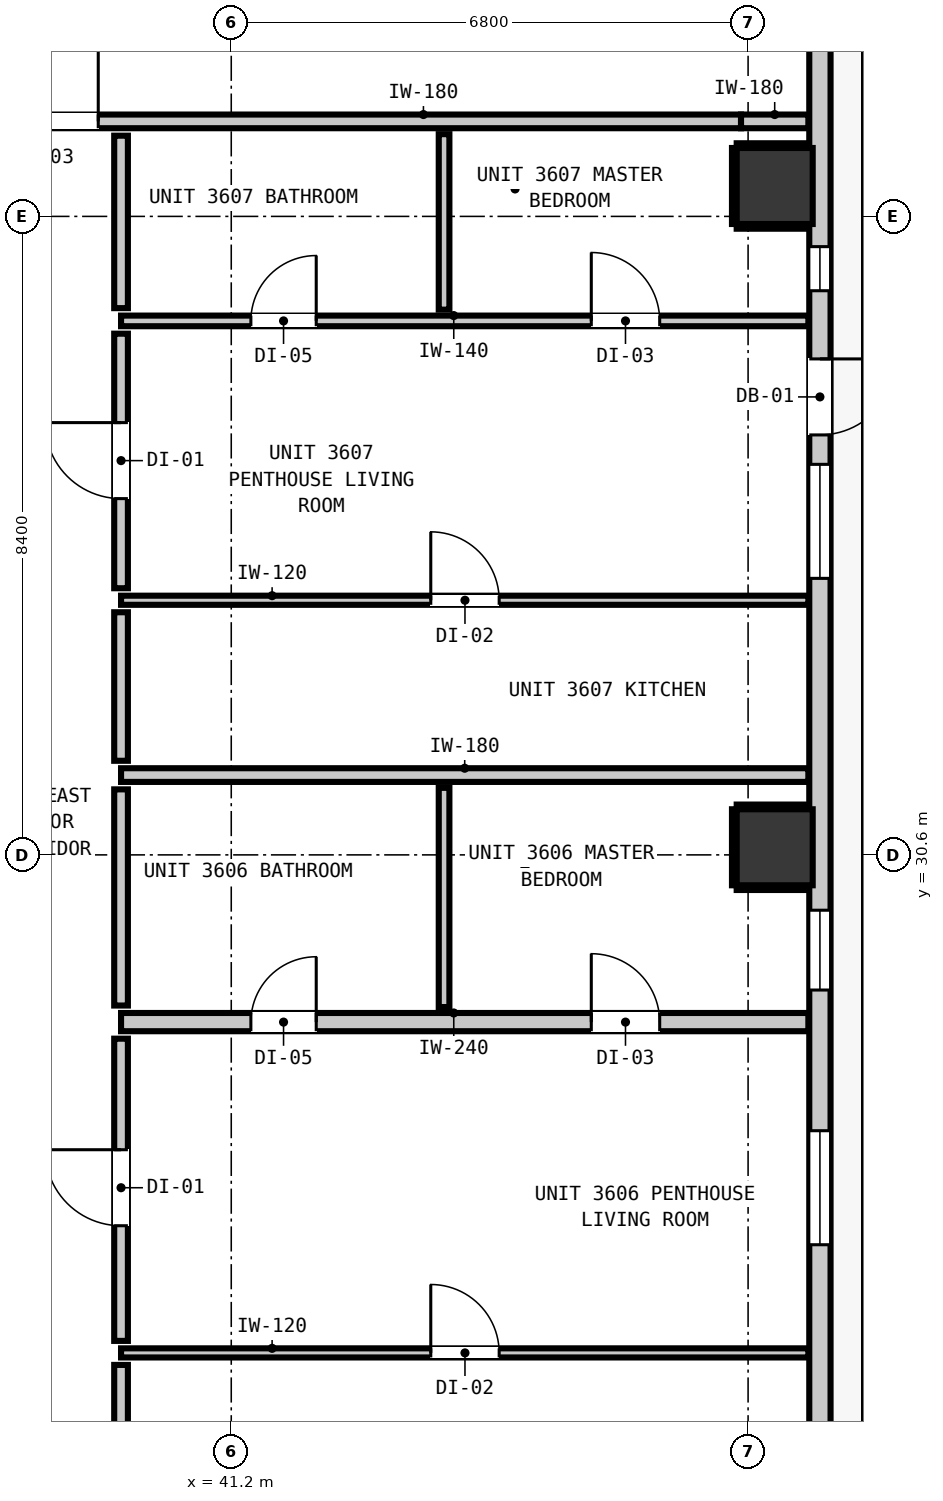
"""IFC4 building model, lengths in metres.
Left out: names, types, materials, properties, quantities, classifications, styles, units other than length and angle.
Written with IfcOpenShell. Run it as: python <this file> out.ifc"""

import sys

from ifc_helpers import new_model, si_unit, direction, frame, frame_2d, origin, origin_2d, place, context, subcontext, project, spatial, rectangle, extrude, element, fill, save


model = new_model("IFC4")
c1 = context("Model", 3, precision=1e-05, world=origin(), true_north=direction((0.0, 1.0)))
c2 = subcontext(c1, "Body", "Model", "MODEL_VIEW")
j1 = project(units=[si_unit("LENGTHUNIT", "METRE"), si_unit("PLANEANGLEUNIT", "RADIAN")], contexts=[c1])
p1 = place(None, origin())
s1 = spatial("IfcSite", under=j1, at=p1, CompositionType="ELEMENT")
p2 = place(p1, origin())
s2 = spatial("IfcBuilding", under=s1, at=p2, CompositionType="ELEMENT")
p3 = place(p2, frame((0.0, 0.0, 126.0)))
s3 = spatial("IfcBuildingStorey", under=s2, at=p3, CompositionType="ELEMENT", Elevation=126.0)
for number, where, z_axis, x_axis in (
    (1, (48.35, 30.7, -0.2), (0.0, 0.0, 1.0), (1.0, 0.0, 0.0)),
    (2, (48.35, 39.4, -0.2), (0.0, 0.0, 1.0), (1.0, 0.0, 0.0)),
):
    element("IfcColumn", number, at=place(p3, frame(where, z_axis=z_axis, x_axis=x_axis)), inside=s3, PredefinedType="COLUMN", context=c2, shape_type="SweptSolid", body=[
        extrude(rectangle(XDim=1.0, YDim=1.0, at=origin_2d()), origin(), (0.0, 0.0, 1.0), 3.52),
    ])
p4 = place(p3, frame((48.945, 43.645, 0.0), z_axis=(0.0, 0.0, 1.0), x_axis=(0.0, -1.0, 0.0)))
e3 = element("IfcWall", 3, at=p4, inside=s3, PredefinedType="STANDARD", context=c2, shape_type="SweptSolid", body=[
    extrude(rectangle(XDim=32.29, YDim=0.28, at=frame_2d((16.145, 0.0))), origin(), (0.0, 0.0, 1.0), 3.08),
])
p5 = place(p4, frame((6.52, 0.0, 0.0)))
e4 = element("IfcOpeningElement", 4, at=p5, cuts=e3, PredefinedType="OPENING", context=c2, shape_type="SweptSolid", body=[
    extrude(rectangle(XDim=1.0, YDim=2.15, at=frame_2d((0.5, 1.075))), frame((0.0, 0.15, 0.0), z_axis=(0.0, -1.0, 0.0), x_axis=(1.0, 0.0, 0.0)), (0.0, 0.0, 1.0), 0.3),
])
p6 = place(p4, frame((0.318, 0.0, 0.85)))
e5 = element("IfcOpeningElement", 5, at=p6, cuts=e3, PredefinedType="OPENING", context=c2, shape_type="SweptSolid", body=[
    extrude(rectangle(XDim=1.05, YDim=1.65, at=frame_2d((0.525, 0.825))), frame((0.0, 0.15, 0.0), z_axis=(0.0, -1.0, 0.0), x_axis=(1.0, 0.0, 0.0)), (0.0, 0.0, 1.0), 0.3),
])
p7 = place(p4, frame((16.674, 0.0, 0.85)))
e6 = element("IfcOpeningElement", 6, at=p7, cuts=e3, PredefinedType="OPENING", context=c2, shape_type="SweptSolid", body=[
    extrude(rectangle(XDim=1.5, YDim=1.8, at=frame_2d((0.75, 0.9))), frame((0.0, 0.15, 0.0), z_axis=(0.0, -1.0, 0.0), x_axis=(1.0, 0.0, 0.0)), (0.0, 0.0, 1.0), 0.3),
])
p8 = place(p4, frame((13.773, 0.0, 0.85)))
e7 = element("IfcOpeningElement", 7, at=p8, cuts=e3, PredefinedType="OPENING", context=c2, shape_type="SweptSolid", body=[
    extrude(rectangle(XDim=1.05, YDim=1.65, at=frame_2d((0.525, 0.825))), frame((0.0, 0.15, 0.0), z_axis=(0.0, -1.0, 0.0), x_axis=(1.0, 0.0, 0.0)), (0.0, 0.0, 1.0), 0.3),
])
p9 = place(p4, frame((7.907, 0.0, 0.85)))
e8 = element("IfcOpeningElement", 8, at=p9, cuts=e3, PredefinedType="OPENING", context=c2, shape_type="SweptSolid", body=[
    extrude(rectangle(XDim=1.5, YDim=1.8, at=frame_2d((0.75, 0.9))), frame((0.0, 0.15, 0.0), z_axis=(0.0, -1.0, 0.0), x_axis=(1.0, 0.0, 0.0)), (0.0, 0.0, 1.0), 0.3),
])
p10 = place(p4, frame((5.043, 0.0, 0.85)))
e9 = element("IfcOpeningElement", 9, at=p10, cuts=e3, PredefinedType="OPENING", context=c2, shape_type="SweptSolid", body=[
    extrude(rectangle(XDim=0.58, YDim=1.5, at=frame_2d((0.29, 0.75))), frame((0.0, 0.15, 0.0), z_axis=(0.0, -1.0, 0.0), x_axis=(1.0, 0.0, 0.0)), (0.0, 0.0, 1.0), 0.3),
])
p11 = place(p3, frame((39.75, 28.4, 0.0), z_axis=(0.0, 0.0, 1.0), x_axis=(1.0, 0.0, 0.0)))
e10 = element("IfcWall", 10, at=p11, inside=s3, PredefinedType="PARTITIONING", context=c2, shape_type="SweptSolid", body=[
    extrude(rectangle(XDim=9.043, YDim=0.24, at=frame_2d((4.521, 0.0))), origin(), (0.0, 0.0, 1.0), 3.08),
])
p12 = place(p11, frame((1.708, 0.0, 0.0)))
e11 = element("IfcOpeningElement", 11, at=p12, cuts=e10, PredefinedType="OPENING", context=c2, shape_type="SweptSolid", body=[
    extrude(rectangle(XDim=0.86, YDim=2.02, at=frame_2d((0.43, 1.01))), frame((0.0, 0.13, 0.0), z_axis=(0.0, -1.0, 0.0), x_axis=(1.0, 0.0, 0.0)), (0.0, 0.0, 1.0), 0.26),
])
p13 = place(p11, frame((6.187, 0.0, 0.0)))
e12 = element("IfcOpeningElement", 12, at=p13, cuts=e10, PredefinedType="OPENING", context=c2, shape_type="SweptSolid", body=[
    extrude(rectangle(XDim=0.9, YDim=2.1, at=frame_2d((0.45, 1.05))), frame((0.0, 0.13, 0.0), z_axis=(0.0, -1.0, 0.0), x_axis=(1.0, 0.0, 0.0)), (0.0, 0.0, 1.0), 0.26),
])
p14 = place(p3, frame((39.75, 31.65, 0.0), z_axis=(0.0, 0.0, 1.0), x_axis=(1.0, 0.0, 0.0)))
e13 = element("IfcWall", 13, at=p14, inside=s3, PredefinedType="PARTITIONING", context=c2, shape_type="SweptSolid", body=[
    extrude(rectangle(XDim=9.043, YDim=0.18, at=frame_2d((4.521, 0.0))), origin(), (0.0, 0.0, 1.0), 3.08),
])
p15 = place(p3, frame((36.943, 40.25, 0.0), z_axis=(0.0, 0.0, 1.0), x_axis=(1.0, 0.0, 0.0)))
e14 = element("IfcWall", 14, at=p15, inside=s3, PredefinedType="PARTITIONING", context=c2, shape_type="SweptSolid", body=[
    extrude(rectangle(XDim=10.964, YDim=0.18, at=frame_2d((5.482, 0.0))), origin(), (0.0, 0.0, 1.0), 2.565),
])
p16 = place(p15, frame((1.107, 0.0, 0.0)))
e15 = element("IfcOpeningElement", 15, at=p16, cuts=e14, PredefinedType="OPENING", context=c2, shape_type="SweptSolid", body=[
    extrude(rectangle(XDim=1.4, YDim=2.15, at=frame_2d((0.7, 1.075))), frame((0.0, 0.1, 0.0), z_axis=(0.0, -1.0, 0.0), x_axis=(1.0, 0.0, 0.0)), (0.0, 0.0, 1.0), 0.2),
])
p17 = place(p3, frame((47.907, 40.25, 0.0), z_axis=(0.0, 0.0, 1.0), x_axis=(1.0, 0.0, 0.0)))
e16 = element("IfcWall", 16, at=p17, inside=s3, PredefinedType="PARTITIONING", context=c2, shape_type="SweptSolid", body=[
    extrude(rectangle(XDim=0.886, YDim=0.18, at=frame_2d((0.443, 0.0))), origin(), (0.0, 0.0, 1.0), 3.08),
])
p18 = place(p3, frame((39.75, 37.625, 0.0), z_axis=(0.0, 0.0, 1.0), x_axis=(1.0, 0.0, 0.0)))
e17 = element("IfcWall", 17, at=p18, inside=s3, PredefinedType="PARTITIONING", context=c2, shape_type="SweptSolid", body=[
    extrude(rectangle(XDim=9.043, YDim=0.14, at=frame_2d((4.521, 0.0))), origin(), (0.0, 0.0, 1.0), 3.08),
])
p19 = place(p18, frame((1.708, 0.0, 0.0)))
e18 = element("IfcOpeningElement", 18, at=p19, cuts=e17, PredefinedType="OPENING", context=c2, shape_type="SweptSolid", body=[
    extrude(rectangle(XDim=0.86, YDim=2.02, at=frame_2d((0.43, 1.01))), frame((0.0, 0.08, 0.0), z_axis=(0.0, -1.0, 0.0), x_axis=(1.0, 0.0, 0.0)), (0.0, 0.0, 1.0), 0.16),
])
p20 = place(p18, frame((6.187, 0.0, 0.0)))
e19 = element("IfcOpeningElement", 19, at=p20, cuts=e17, PredefinedType="OPENING", context=c2, shape_type="SweptSolid", body=[
    extrude(rectangle(XDim=0.9, YDim=2.1, at=frame_2d((0.45, 1.05))), frame((0.0, 0.08, 0.0), z_axis=(0.0, -1.0, 0.0), x_axis=(1.0, 0.0, 0.0)), (0.0, 0.0, 1.0), 0.16),
])
p21 = place(p3, frame((39.75, 24.048, 0.0), z_axis=(0.0, 0.0, 1.0), x_axis=(1.0, 0.0, 0.0)))
e20 = element("IfcWall", 20, at=p21, inside=s3, PredefinedType="PARTITIONING", context=c2, shape_type="SweptSolid", body=[
    extrude(rectangle(XDim=9.043, YDim=0.12, at=frame_2d((4.521, 0.0))), origin(), (0.0, 0.0, 1.0), 3.08),
])
p22 = place(p21, frame((4.075, 0.0, 0.0)))
e21 = element("IfcOpeningElement", 21, at=p22, cuts=e20, PredefinedType="OPENING", context=c2, shape_type="SweptSolid", body=[
    extrude(rectangle(XDim=0.9, YDim=2.1, at=frame_2d((0.45, 1.05))), frame((0.0, 0.07, 0.0), z_axis=(0.0, -1.0, 0.0), x_axis=(1.0, 0.0, 0.0)), (0.0, 0.0, 1.0), 0.14),
])
p23 = place(p3, frame((39.75, 33.95, 0.0), z_axis=(0.0, 0.0, 1.0), x_axis=(1.0, 0.0, 0.0)))
e22 = element("IfcWall", 22, at=p23, inside=s3, PredefinedType="PARTITIONING", context=c2, shape_type="SweptSolid", body=[
    extrude(rectangle(XDim=9.043, YDim=0.12, at=frame_2d((4.521, 0.0))), origin(), (0.0, 0.0, 1.0), 3.08),
])
p24 = place(p23, frame((4.075, 0.0, 0.0)))
e23 = element("IfcOpeningElement", 23, at=p24, cuts=e22, PredefinedType="OPENING", context=c2, shape_type="SweptSolid", body=[
    extrude(rectangle(XDim=0.9, YDim=2.1, at=frame_2d((0.45, 1.05))), frame((0.0, 0.07, 0.0), z_axis=(0.0, -1.0, 0.0), x_axis=(1.0, 0.0, 0.0)), (0.0, 0.0, 1.0), 0.14),
])
p25 = place(p3, frame((39.75, 21.368, 0.0), z_axis=(0.0, 0.0, 1.0), x_axis=(0.0, 1.0, 0.0)))
e24 = element("IfcWall", 24, at=p25, inside=s3, PredefinedType="PARTITIONING", context=c2, shape_type="SweptSolid", body=[
    extrude(rectangle(XDim=2.522, YDim=0.18, at=frame_2d((1.261, 0.0))), origin(), (0.0, 0.0, 1.0), 3.08),
])
p26 = place(p3, frame((39.75, 24.206, 0.0), z_axis=(0.0, 0.0, 1.0), x_axis=(0.0, 1.0, 0.0)))
e25 = element("IfcWall", 25, at=p26, inside=s3, PredefinedType="PARTITIONING", context=c2, shape_type="SweptSolid", body=[
    extrude(rectangle(XDim=3.976, YDim=0.18, at=frame_2d((1.988, 0.0))), origin(), (0.0, 0.0, 1.0), 3.08),
])
p27 = place(p26, frame((1.515, 0.0, 0.0)))
e26 = element("IfcOpeningElement", 26, at=p27, cuts=e25, PredefinedType="OPENING", context=c2, shape_type="SweptSolid", body=[
    extrude(rectangle(XDim=1.0, YDim=2.15, at=frame_2d((0.5, 1.075))), frame((0.0, 0.1, 0.0), z_axis=(0.0, -1.0, 0.0), x_axis=(1.0, 0.0, 0.0)), (0.0, 0.0, 1.0), 0.2),
])
p28 = place(p3, frame((39.75, 28.618, 0.0), z_axis=(0.0, 0.0, 1.0), x_axis=(0.0, 1.0, 0.0)))
e27 = element("IfcWall", 27, at=p28, inside=s3, PredefinedType="PARTITIONING", context=c2, shape_type="SweptSolid", body=[
    extrude(rectangle(XDim=2.844, YDim=0.18, at=frame_2d((1.422, 0.0))), origin(), (0.0, 0.0, 1.0), 3.08),
])
p29 = place(p3, frame((39.75, 31.838, 0.0), z_axis=(0.0, 0.0, 1.0), x_axis=(0.0, 1.0, 0.0)))
e28 = element("IfcWall", 28, at=p29, inside=s3, PredefinedType="PARTITIONING", context=c2, shape_type="SweptSolid", body=[
    extrude(rectangle(XDim=1.954, YDim=0.18, at=frame_2d((0.977, 0.0))), origin(), (0.0, 0.0, 1.0), 3.08),
])
p30 = place(p3, frame((39.75, 34.108, 0.0), z_axis=(0.0, 0.0, 1.0), x_axis=(0.0, 1.0, 0.0)))
e29 = element("IfcWall", 29, at=p30, inside=s3, PredefinedType="PARTITIONING", context=c2, shape_type="SweptSolid", body=[
    extrude(rectangle(XDim=3.349, YDim=0.18, at=frame_2d((1.675, 0.0))), origin(), (0.0, 0.0, 1.0), 3.08),
])
p31 = place(p30, frame((1.179, 0.0, 0.0)))
e30 = element("IfcOpeningElement", 30, at=p31, cuts=e29, PredefinedType="OPENING", context=c2, shape_type="SweptSolid", body=[
    extrude(rectangle(XDim=1.0, YDim=2.15, at=frame_2d((0.5, 1.075))), frame((0.0, 0.1, 0.0), z_axis=(0.0, -1.0, 0.0), x_axis=(1.0, 0.0, 0.0)), (0.0, 0.0, 1.0), 0.2),
])
p32 = place(p3, frame((39.75, 37.793, 0.0), z_axis=(0.0, 0.0, 1.0), x_axis=(0.0, 1.0, 0.0)))
e31 = element("IfcWall", 31, at=p32, inside=s3, PredefinedType="PARTITIONING", context=c2, shape_type="SweptSolid", body=[
    extrude(rectangle(XDim=2.269, YDim=0.18, at=frame_2d((1.135, 0.0))), origin(), (0.0, 0.0, 1.0), 3.08),
])
p33 = place(p3, frame((44.0, 28.598, 0.0), z_axis=(0.0, 0.0, 1.0), x_axis=(0.0, 1.0, 0.0)))
e32 = element("IfcWall", 32, at=p33, inside=s3, PredefinedType="PARTITIONING", context=c2, shape_type="SweptSolid", body=[
    extrude(rectangle(XDim=2.884, YDim=0.14, at=frame_2d((1.442, 0.0))), origin(), (0.0, 0.0, 1.0), 3.08),
])
p34 = place(p3, frame((44.0, 37.773, 0.0), z_axis=(0.0, 0.0, 1.0), x_axis=(0.0, 1.0, 0.0)))
e33 = element("IfcWall", 33, at=p34, inside=s3, PredefinedType="PARTITIONING", context=c2, shape_type="SweptSolid", body=[
    extrude(rectangle(XDim=2.309, YDim=0.14, at=frame_2d((1.155, 0.0))), origin(), (0.0, 0.0, 1.0), 3.08),
])
for number, where, z_axis, x_axis in (
    (34, (47.85, 30.168, 0.0), (0.0, 0.0, 1.0), (1.0, 0.0, 0.0)),
    (35, (47.85, 31.232, 0.0), (0.0, 0.0, 1.0), (1.0, 0.0, 0.0)),
):
    element("IfcWall", number, at=place(p3, frame(where, z_axis=z_axis, x_axis=x_axis)), inside=s3, PredefinedType="PARTITIONING", context=c2, shape_type="SweptSolid", body=[
        extrude(rectangle(XDim=0.94, YDim=0.06, at=frame_2d((0.47, 0.0))), origin(), (0.0, 0.0, 1.0), 1.45),
    ])
p35 = place(p3, frame((47.818, 30.2, 0.0), z_axis=(0.0, 0.0, 1.0), x_axis=(0.0, 1.0, 0.0)))
e36 = element("IfcWall", 36, at=p35, inside=s3, PredefinedType="PARTITIONING", context=c2, shape_type="SweptSolid", body=[
    extrude(rectangle(XDim=1.0, YDim=0.06, at=frame_2d((0.5, 0.0))), origin(), (0.0, 0.0, 1.0), 1.45),
])
for number, where, z_axis, x_axis in (
    (37, (47.85, 38.868, 0.0), (0.0, 0.0, 1.0), (1.0, 0.0, 0.0)),
    (38, (47.85, 39.932, 0.0), (0.0, 0.0, 1.0), (1.0, 0.0, 0.0)),
):
    element("IfcWall", number, at=place(p3, frame(where, z_axis=z_axis, x_axis=x_axis)), inside=s3, PredefinedType="PARTITIONING", context=c2, shape_type="SweptSolid", body=[
        extrude(rectangle(XDim=0.94, YDim=0.06, at=frame_2d((0.47, 0.0))), origin(), (0.0, 0.0, 1.0), 1.45),
    ])
p36 = place(p3, frame((47.818, 38.9, 0.0), z_axis=(0.0, 0.0, 1.0), x_axis=(0.0, 1.0, 0.0)))
e39 = element("IfcWall", 39, at=p36, inside=s3, PredefinedType="PARTITIONING", context=c2, shape_type="SweptSolid", body=[
    extrude(rectangle(XDim=1.0, YDim=0.06, at=frame_2d((0.5, 0.0))), origin(), (0.0, 0.0, 1.0), 1.45),
])
p37 = place(p5, origin())
e40 = element("IfcDoor", 40, at=p37, inside=s3, OperationType="SINGLE_SWING_LEFT", PredefinedType="DOOR", context=c2, shape_type="SweptSolid", body=[
    extrude(rectangle(XDim=1.0, YDim=2.15, at=frame_2d((0.5, 1.075))), frame((0.0, 0.025, 0.0), z_axis=(0.0, -1.0, 0.0), x_axis=(1.0, 0.0, 0.0)), (0.0, 0.0, 1.0), 0.05),
])
fill(e4, e40)
p38 = place(p7, origin())
e41 = element("IfcWindow", 41, at=p38, inside=s3, PartitioningType="SINGLE_PANEL", PredefinedType="WINDOW", context=c2, shape_type="SweptSolid", body=[
    extrude(rectangle(XDim=1.5, YDim=1.8, at=frame_2d((0.75, 0.9))), frame((0.0, 0.03, 0.0), z_axis=(0.0, -1.0, 0.0), x_axis=(1.0, 0.0, 0.0)), (0.0, 0.0, 1.0), 0.06),
])
fill(e6, e41)
p39 = place(p8, origin())
e42 = element("IfcWindow", 42, at=p39, inside=s3, PartitioningType="SINGLE_PANEL", PredefinedType="WINDOW", context=c2, shape_type="SweptSolid", body=[
    extrude(rectangle(XDim=1.05, YDim=1.65, at=frame_2d((0.525, 0.825))), frame((0.0, 0.03, 0.0), z_axis=(0.0, -1.0, 0.0), x_axis=(1.0, 0.0, 0.0)), (0.0, 0.0, 1.0), 0.06),
])
fill(e7, e42)
p40 = place(p9, origin())
e43 = element("IfcWindow", 43, at=p40, inside=s3, PartitioningType="SINGLE_PANEL", PredefinedType="WINDOW", context=c2, shape_type="SweptSolid", body=[
    extrude(rectangle(XDim=1.5, YDim=1.8, at=frame_2d((0.75, 0.9))), frame((0.0, 0.03, 0.0), z_axis=(0.0, -1.0, 0.0), x_axis=(1.0, 0.0, 0.0)), (0.0, 0.0, 1.0), 0.06),
])
fill(e8, e43)
p41 = place(p10, origin())
e44 = element("IfcWindow", 44, at=p41, inside=s3, PartitioningType="SINGLE_PANEL", PredefinedType="WINDOW", context=c2, shape_type="SweptSolid", body=[
    extrude(rectangle(XDim=0.58, YDim=1.5, at=frame_2d((0.29, 0.75))), frame((0.0, 0.03, 0.0), z_axis=(0.0, -1.0, 0.0), x_axis=(1.0, 0.0, 0.0)), (0.0, 0.0, 1.0), 0.06),
])
fill(e9, e44)
p42 = place(p16, origin())
e45 = element("IfcDoor", 45, at=p42, inside=s3, OperationType="SINGLE_SWING_RIGHT", PredefinedType="DOOR", context=c2, shape_type="SweptSolid", body=[
    extrude(rectangle(XDim=1.4, YDim=2.15, at=frame_2d((0.7, 1.075))), frame((0.0, 0.025, 0.0), z_axis=(0.0, -1.0, 0.0), x_axis=(1.0, 0.0, 0.0)), (0.0, 0.0, 1.0), 0.05),
])
fill(e15, e45)
p43 = place(p27, origin())
e46 = element("IfcDoor", 46, at=p43, inside=s3, OperationType="SINGLE_SWING_RIGHT", PredefinedType="DOOR", context=c2, shape_type="SweptSolid", body=[
    extrude(rectangle(XDim=1.0, YDim=2.15, at=frame_2d((0.5, 1.075))), frame((0.0, 0.025, 0.0), z_axis=(0.0, -1.0, 0.0), x_axis=(1.0, 0.0, 0.0)), (0.0, 0.0, 1.0), 0.05),
])
fill(e26, e46)
p44 = place(p22, origin())
e47 = element("IfcDoor", 47, at=p44, inside=s3, OperationType="SINGLE_SWING_LEFT", PredefinedType="DOOR", context=c2, shape_type="SweptSolid", body=[
    extrude(rectangle(XDim=0.9, YDim=2.1, at=frame_2d((0.45, 1.05))), frame((0.0, 0.025, 0.0), z_axis=(0.0, -1.0, 0.0), x_axis=(1.0, 0.0, 0.0)), (0.0, 0.0, 1.0), 0.05),
])
fill(e21, e47)
p45 = place(p12, origin())
e48 = element("IfcDoor", 48, at=p45, inside=s3, OperationType="SINGLE_SWING_RIGHT", PredefinedType="DOOR", context=c2, shape_type="SweptSolid", body=[
    extrude(rectangle(XDim=0.86, YDim=2.02, at=frame_2d((0.43, 1.01))), frame((0.0, 0.025, 0.0), z_axis=(0.0, -1.0, 0.0), x_axis=(1.0, 0.0, 0.0)), (0.0, 0.0, 1.0), 0.05),
])
fill(e11, e48)
p46 = place(p13, origin())
e49 = element("IfcDoor", 49, at=p46, inside=s3, OperationType="SINGLE_SWING_LEFT", PredefinedType="DOOR", context=c2, shape_type="SweptSolid", body=[
    extrude(rectangle(XDim=0.9, YDim=2.1, at=frame_2d((0.45, 1.05))), frame((0.0, 0.025, 0.0), z_axis=(0.0, -1.0, 0.0), x_axis=(1.0, 0.0, 0.0)), (0.0, 0.0, 1.0), 0.05),
])
fill(e12, e49)
p47 = place(p31, origin())
e50 = element("IfcDoor", 50, at=p47, inside=s3, OperationType="SINGLE_SWING_RIGHT", PredefinedType="DOOR", context=c2, shape_type="SweptSolid", body=[
    extrude(rectangle(XDim=1.0, YDim=2.15, at=frame_2d((0.5, 1.075))), frame((0.0, 0.025, 0.0), z_axis=(0.0, -1.0, 0.0), x_axis=(1.0, 0.0, 0.0)), (0.0, 0.0, 1.0), 0.05),
])
fill(e30, e50)
p48 = place(p24, origin())
e51 = element("IfcDoor", 51, at=p48, inside=s3, OperationType="SINGLE_SWING_LEFT", PredefinedType="DOOR", context=c2, shape_type="SweptSolid", body=[
    extrude(rectangle(XDim=0.9, YDim=2.1, at=frame_2d((0.45, 1.05))), frame((0.0, 0.025, 0.0), z_axis=(0.0, -1.0, 0.0), x_axis=(1.0, 0.0, 0.0)), (0.0, 0.0, 1.0), 0.05),
])
fill(e23, e51)
p49 = place(p19, origin())
e52 = element("IfcDoor", 52, at=p49, inside=s3, OperationType="SINGLE_SWING_RIGHT", PredefinedType="DOOR", context=c2, shape_type="SweptSolid", body=[
    extrude(rectangle(XDim=0.86, YDim=2.02, at=frame_2d((0.43, 1.01))), frame((0.0, 0.025, 0.0), z_axis=(0.0, -1.0, 0.0), x_axis=(1.0, 0.0, 0.0)), (0.0, 0.0, 1.0), 0.05),
])
fill(e18, e52)
p50 = place(p20, origin())
e53 = element("IfcDoor", 53, at=p50, inside=s3, OperationType="SINGLE_SWING_LEFT", PredefinedType="DOOR", context=c2, shape_type="SweptSolid", body=[
    extrude(rectangle(XDim=0.9, YDim=2.1, at=frame_2d((0.45, 1.05))), frame((0.0, 0.025, 0.0), z_axis=(0.0, -1.0, 0.0), x_axis=(1.0, 0.0, 0.0)), (0.0, 0.0, 1.0), 0.05),
])
fill(e19, e53)
save(model, sys.argv[1])
